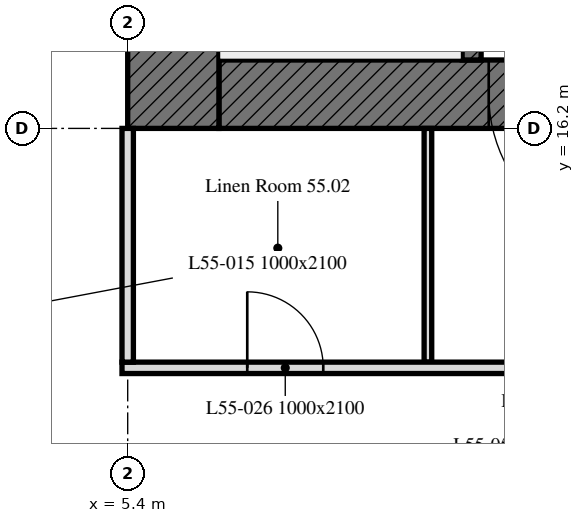
"""IFC4 building model, lengths in metres.
Left out: names, types, materials, properties, quantities, classifications, styles, units other than length and angle.
Written with IfcOpenShell. Run it as: python <this file> out.ifc"""

import sys

from ifc_helpers import new_model, si_unit, direction, frame, frame_2d, origin, place, context, subcontext, project, spatial, rectangle, extrude, element, fill, save


model = new_model("IFC4")
c1 = context("Model", 3, precision=1e-05, world=origin(), true_north=direction((0.0, 1.0)))
c2 = subcontext(c1, "Body", "Model", "MODEL_VIEW")
j1 = project(units=[si_unit("LENGTHUNIT", "METRE"), si_unit("PLANEANGLEUNIT", "RADIAN")], contexts=[c1])
p1 = place(None, origin())
s1 = spatial("IfcSite", under=j1, at=p1, CompositionType="ELEMENT")
p2 = place(p1, origin())
s2 = spatial("IfcBuilding", under=s1, at=p2, CompositionType="ELEMENT")
p3 = place(p2, frame((0.0, 0.0, 220.3)))
s3 = spatial("IfcBuildingStorey", under=s2, at=p3, CompositionType="ELEMENT", Elevation=220.3)
p4 = place(p3, frame((17.7, 16.65, 0.0), z_axis=(0.0, 0.0, 1.0), x_axis=(-1.0, 0.0, 0.0)))
e1 = element("IfcWall", 1, at=p4, inside=s3, PredefinedType="SOLIDWALL", context=c2, shape_type="SweptSolid", body=[
    extrude(rectangle(XDim=11.1, YDim=0.9, at=frame_2d((5.55, 0.0))), origin(), (0.0, 0.0, 1.0), 3.0),
])
p5 = place(p4, frame((5.55, 0.0, 0.0)))
e2 = element("IfcOpeningElement", 2, at=p5, cuts=e1, PredefinedType="OPENING", context=c2, shape_type="SweptSolid", body=[
    extrude(rectangle(XDim=2.0, YDim=2.4, at=frame_2d((1.0, 1.2))), frame((0.0, 0.45, 0.0), z_axis=(0.0, -1.0, 0.0), x_axis=(1.0, 0.0, 0.0)), (0.0, 0.0, 1.0), 0.9),
])
p6 = place(p3, frame((6.0, 16.2, 0.0), z_axis=(0.0, 0.0, 1.0), x_axis=(0.0, 1.0, 0.0)))
e3 = element("IfcWall", 3, at=p6, inside=s3, PredefinedType="SOLIDWALL", context=c2, shape_type="SweptSolid", body=[
    extrude(rectangle(XDim=16.2, YDim=1.2, at=frame_2d((8.1, 0.0))), origin(), (0.0, 0.0, 1.0), 3.0),
])
p7 = place(p3, frame((9.925, 17.1, 0.0), z_axis=(0.0, 0.0, 1.0), x_axis=(0.0, 1.0, 0.0)))
e4 = element("IfcWall", 4, at=p7, inside=s3, PredefinedType="SOLIDWALL", context=c2, shape_type="SweptSolid", body=[
    extrude(rectangle(XDim=14.4, YDim=0.25, at=frame_2d((7.2, 0.0))), origin(), (0.0, 0.0, 1.0), 3.0),
])
p8 = place(p7, frame((4.6, 0.0, 0.0)))
e5 = element("IfcOpeningElement", 5, at=p8, cuts=e4, PredefinedType="OPENING", context=c2, shape_type="SweptSolid", body=[
    extrude(rectangle(XDim=1.0, YDim=2.1, at=frame_2d((0.5, 1.05))), frame((0.0, 0.125, 0.0), z_axis=(0.0, -1.0, 0.0), x_axis=(1.0, 0.0, 0.0)), (0.0, 0.0, 1.0), 0.25),
])
p9 = place(p7, frame((7.062, 0.0, 0.0)))
e6 = element("IfcOpeningElement", 6, at=p9, cuts=e4, PredefinedType="OPENING", context=c2, shape_type="SweptSolid", body=[
    extrude(rectangle(XDim=1.2, YDim=2.1, at=frame_2d((0.6, 1.05))), frame((0.0, 0.125, 0.0), z_axis=(0.0, -1.0, 0.0), x_axis=(1.0, 0.0, 0.0)), (0.0, 0.0, 1.0), 0.25),
])
p10 = place(p7, frame((9.472, 0.0, 0.0)))
e7 = element("IfcOpeningElement", 7, at=p10, cuts=e4, PredefinedType="OPENING", context=c2, shape_type="SweptSolid", body=[
    extrude(rectangle(XDim=0.9, YDim=2.1, at=frame_2d((0.45, 1.05))), frame((0.0, 0.125, 0.0), z_axis=(0.0, -1.0, 0.0), x_axis=(1.0, 0.0, 0.0)), (0.0, 0.0, 1.0), 0.25),
])
p11 = place(p7, frame((11.159, 0.0, 0.0)))
e8 = element("IfcOpeningElement", 8, at=p11, cuts=e4, PredefinedType="OPENING", context=c2, shape_type="SweptSolid", body=[
    extrude(rectangle(XDim=0.9, YDim=2.1, at=frame_2d((0.45, 1.05))), frame((0.0, 0.125, 0.0), z_axis=(0.0, -1.0, 0.0), x_axis=(1.0, 0.0, 0.0)), (0.0, 0.0, 1.0), 0.25),
])
p12 = place(p7, frame((13.1, 0.0, 0.0)))
e9 = element("IfcOpeningElement", 9, at=p12, cuts=e4, PredefinedType="OPENING", context=c2, shape_type="SweptSolid", body=[
    extrude(rectangle(XDim=0.9, YDim=2.1, at=frame_2d((0.45, 1.05))), frame((0.0, 0.125, 0.0), z_axis=(0.0, -1.0, 0.0), x_axis=(1.0, 0.0, 0.0)), (0.0, 0.0, 1.0), 0.25),
])
p13 = place(p3, frame((9.35, 16.2, 0.0), z_axis=(0.0, 0.0, 1.0), x_axis=(0.0, -1.0, 0.0)))
e10 = element("IfcWall", 10, at=p13, inside=s3, PredefinedType="PARTITIONING", context=c2, shape_type="SweptSolid", body=[
    extrude(rectangle(XDim=3.075, YDim=0.1, at=frame_2d((1.538, 0.0))), origin(), (0.0, 0.0, 1.0), 3.0),
])
p14 = place(p3, frame((5.325, 13.05, 0.0), z_axis=(0.0, 0.0, 1.0), x_axis=(1.0, 0.0, 0.0)))
e11 = element("IfcWall", 11, at=p14, inside=s3, PredefinedType="PARTITIONING", context=c2, shape_type="SweptSolid", body=[
    extrude(rectangle(XDim=37.124, YDim=0.15, at=frame_2d((18.562, 0.0))), origin(), (0.0, 0.0, 1.0), 3.0),
])
p15 = place(p14, frame((23.875, 0.0, 0.0)))
e12 = element("IfcOpeningElement", 12, at=p15, cuts=e11, PredefinedType="OPENING", context=c2, shape_type="SweptSolid", body=[
    extrude(rectangle(XDim=1.0, YDim=2.1, at=frame_2d((0.5, 1.05))), frame((0.0, 0.075, 0.0), z_axis=(0.0, -1.0, 0.0), x_axis=(1.0, 0.0, 0.0)), (0.0, 0.0, 1.0), 0.15),
])
p16 = place(p14, frame((13.475, 0.0, 0.0)))
e13 = element("IfcOpeningElement", 13, at=p16, cuts=e11, PredefinedType="OPENING", context=c2, shape_type="SweptSolid", body=[
    extrude(rectangle(XDim=1.0, YDim=2.1, at=frame_2d((0.5, 1.05))), frame((0.0, 0.075, 0.0), z_axis=(0.0, -1.0, 0.0), x_axis=(1.0, 0.0, 0.0)), (0.0, 0.0, 1.0), 0.15),
])
p17 = place(p14, frame((34.095, 0.0, 0.0)))
e14 = element("IfcOpeningElement", 14, at=p17, cuts=e11, PredefinedType="OPENING", context=c2, shape_type="SweptSolid", body=[
    extrude(rectangle(XDim=1.0, YDim=2.1, at=frame_2d((0.5, 1.05))), frame((0.0, 0.075, 0.0), z_axis=(0.0, -1.0, 0.0), x_axis=(1.0, 0.0, 0.0)), (0.0, 0.0, 1.0), 0.15),
])
p18 = place(p14, frame((8.337, 0.0, 0.0)))
e15 = element("IfcOpeningElement", 15, at=p18, cuts=e11, PredefinedType="OPENING", context=c2, shape_type="SweptSolid", body=[
    extrude(rectangle(XDim=1.0, YDim=2.1, at=frame_2d((0.5, 1.05))), frame((0.0, 0.075, 0.0), z_axis=(0.0, -1.0, 0.0), x_axis=(1.0, 0.0, 0.0)), (0.0, 0.0, 1.0), 0.15),
])
p19 = place(p14, frame((1.648, 0.0, 0.0)))
e16 = element("IfcOpeningElement", 16, at=p19, cuts=e11, PredefinedType="OPENING", context=c2, shape_type="SweptSolid", body=[
    extrude(rectangle(XDim=1.0, YDim=2.1, at=frame_2d((0.5, 1.05))), frame((0.0, 0.075, 0.0), z_axis=(0.0, -1.0, 0.0), x_axis=(1.0, 0.0, 0.0)), (0.0, 0.0, 1.0), 0.15),
])
p20 = place(p14, frame((28.613, 0.0, 0.0)))
e17 = element("IfcOpeningElement", 17, at=p20, cuts=e11, PredefinedType="OPENING", context=c2, shape_type="SweptSolid", body=[
    extrude(rectangle(XDim=1.0, YDim=2.1, at=frame_2d((0.5, 1.05))), frame((0.0, 0.075, 0.0), z_axis=(0.0, -1.0, 0.0), x_axis=(1.0, 0.0, 0.0)), (0.0, 0.0, 1.0), 0.15),
])
p21 = place(p14, frame((30.625, 0.0, 0.0)))
e18 = element("IfcOpeningElement", 18, at=p21, cuts=e11, PredefinedType="OPENING", context=c2, shape_type="SweptSolid", body=[
    extrude(rectangle(XDim=1.8, YDim=2.4, at=frame_2d((0.9, 1.2))), frame((0.0, 0.075, 0.0), z_axis=(0.0, -1.0, 0.0), x_axis=(1.0, 0.0, 0.0)), (0.0, 0.0, 1.0), 0.15),
])
p22 = place(p14, frame((5.525, 0.0, 0.0)))
e19 = element("IfcOpeningElement", 19, at=p22, cuts=e11, PredefinedType="OPENING", context=c2, shape_type="SweptSolid", body=[
    extrude(rectangle(XDim=1.8, YDim=2.4, at=frame_2d((0.9, 1.2))), frame((0.0, 0.075, 0.0), z_axis=(0.0, -1.0, 0.0), x_axis=(1.0, 0.0, 0.0)), (0.0, 0.0, 1.0), 0.15),
])
p23 = place(p3, frame((5.4, 13.125, 0.0), z_axis=(0.0, 0.0, 1.0), x_axis=(0.0, 1.0, 0.0)))
e20 = element("IfcWall", 20, at=p23, inside=s3, PredefinedType="PARTITIONING", context=c2, shape_type="SweptSolid", body=[
    extrude(rectangle(XDim=3.075, YDim=0.15, at=frame_2d((1.538, 0.0))), origin(), (0.0, 0.0, 1.0), 3.0),
])
p24 = place(p5, origin())
e21 = element("IfcDoor", 21, at=p24, inside=s3, OperationType="DOUBLE_DOOR_SINGLE_SWING", PredefinedType="DOOR", context=c2, shape_type="SweptSolid", body=[
    extrude(rectangle(XDim=2.0, YDim=2.4, at=frame_2d((1.0, 1.2))), frame((0.0, 0.025, 0.0), z_axis=(0.0, -1.0, 0.0), x_axis=(1.0, 0.0, 0.0)), (0.0, 0.0, 1.0), 0.05),
])
fill(e2, e21)
p25 = place(p19, origin())
e22 = element("IfcDoor", 22, at=p25, inside=s3, OperationType="SINGLE_SWING_LEFT", PredefinedType="DOOR", context=c2, shape_type="SweptSolid", body=[
    extrude(rectangle(XDim=1.0, YDim=2.1, at=frame_2d((0.5, 1.05))), frame((0.0, 0.025, 0.0), z_axis=(0.0, -1.0, 0.0), x_axis=(1.0, 0.0, 0.0)), (0.0, 0.0, 1.0), 0.05),
])
fill(e16, e22)
save(model, sys.argv[1])
